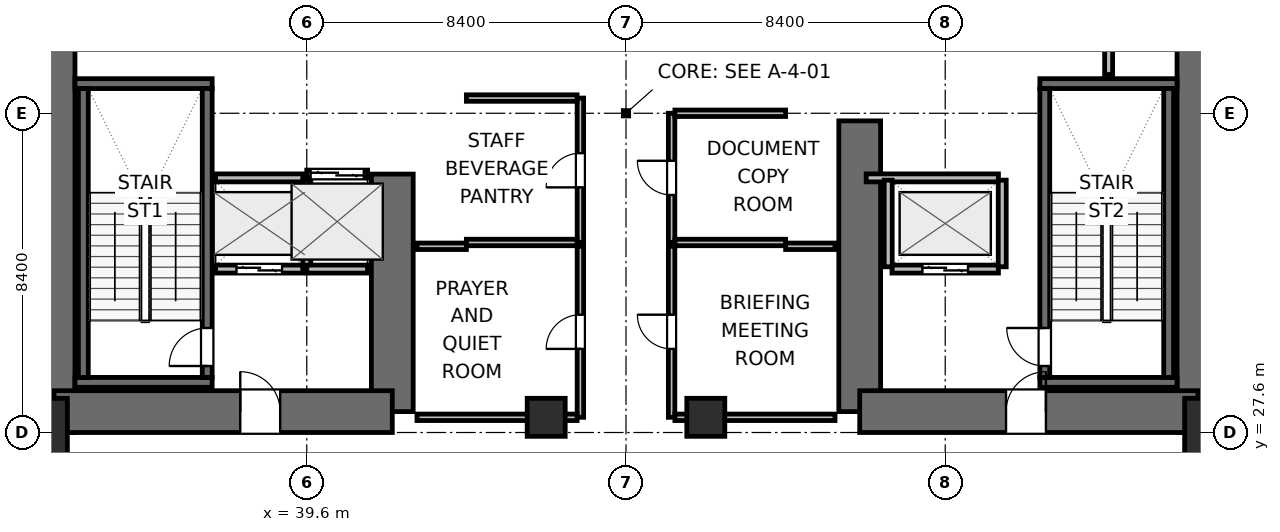
"""IFC4 building model, lengths in metres.
Left out: names, types, materials, properties, quantities, classifications, styles, units other than length and angle.
Written with IfcOpenShell. Run it as: python <this file> out.ifc"""

import sys

from ifc_helpers import new_model, si_unit, direction, frame, frame_2d, origin, origin_2d, place, context, subcontext, project, spatial, rectangle, extrude, element, fill, save


model = new_model("IFC4")
c1 = context("Model", 3, precision=1e-05, world=origin(), true_north=direction((0.0, 1.0)))
c2 = subcontext(c1, "Body", "Model", "MODEL_VIEW")
j1 = project(units=[si_unit("LENGTHUNIT", "METRE"), si_unit("PLANEANGLEUNIT", "RADIAN")], contexts=[c1])
p1 = place(None, origin())
s1 = spatial("IfcSite", under=j1, at=p1, CompositionType="ELEMENT")
p2 = place(p1, origin())
s2 = spatial("IfcBuilding", under=s1, at=p2, CompositionType="ELEMENT")
p3 = place(p2, frame((0.0, 0.0, -4.5)))
s3 = spatial("IfcBuildingStorey", under=s2, at=p3, CompositionType="ELEMENT", Elevation=-4.5)
p4 = place(p3, frame((32.95, 27.6, 0.0), z_axis=(0.0, 0.0, 1.0), x_axis=(0.0, 1.0, 0.0)))
e1 = element("IfcWall", 1, at=p4, inside=s3, PredefinedType="SHEAR", context=c2, shape_type="SweptSolid", body=[
    extrude(rectangle(XDim=16.8, YDim=1.1, at=frame_2d((8.4, 0.0))), origin(), (0.0, 0.0, 1.0), 4.5),
])
p5 = place(p3, frame((41.85, 28.15, 0.0), z_axis=(0.0, 0.0, 1.0), x_axis=(0.0, 1.0, 0.0)))
e2 = element("IfcWall", 2, at=p5, inside=s3, PredefinedType="SHEAR", context=c2, shape_type="SweptSolid", body=[
    extrude(rectangle(XDim=6.25, YDim=1.1, at=frame_2d((3.125, 0.0))), origin(), (0.0, 0.0, 1.0), 4.5),
])
p6 = place(p3, frame((32.95, 28.15, 0.0), z_axis=(0.0, 0.0, 1.0), x_axis=(1.0, 0.0, 0.0)))
e3 = element("IfcWall", 3, at=p6, inside=s3, PredefinedType="SHEAR", context=c2, shape_type="SweptSolid", body=[
    extrude(rectangle(XDim=8.9, YDim=1.1, at=frame_2d((4.45, 0.0))), origin(), (0.0, 0.0, 1.0), 4.5),
])
p7 = place(p6, frame((4.9, 0.0, 0.0)))
e4 = element("IfcOpeningElement", 4, at=p7, cuts=e3, PredefinedType="OPENING", context=c2, shape_type="SweptSolid", body=[
    extrude(rectangle(XDim=1.05, YDim=2.04, at=frame_2d((0.525, 1.02))), frame((0.0, 0.56, 0.0), z_axis=(0.0, -1.0, 0.0), x_axis=(1.0, 0.0, 0.0)), (0.0, 0.0, 1.0), 1.12),
])
p8 = place(p3, frame((54.15, 28.15, 0.0), z_axis=(0.0, 0.0, 1.0), x_axis=(0.0, 1.0, 0.0)))
e5 = element("IfcWall", 5, at=p8, inside=s3, PredefinedType="SHEAR", context=c2, shape_type="SweptSolid", body=[
    extrude(rectangle(XDim=7.65, YDim=1.1, at=frame_2d((3.825, 0.0))), origin(), (0.0, 0.0, 1.0), 4.5),
])
p9 = place(p3, frame((63.05, 27.6, 0.0), z_axis=(0.0, 0.0, 1.0), x_axis=(0.0, 1.0, 0.0)))
e6 = element("IfcWall", 6, at=p9, inside=s3, PredefinedType="SHEAR", context=c2, shape_type="SweptSolid", body=[
    extrude(rectangle(XDim=16.8, YDim=1.1, at=frame_2d((8.4, 0.0))), origin(), (0.0, 0.0, 1.0), 4.5),
])
p10 = place(p3, frame((54.15, 28.15, 0.0), z_axis=(0.0, 0.0, 1.0), x_axis=(1.0, 0.0, 0.0)))
e7 = element("IfcWall", 7, at=p10, inside=s3, PredefinedType="SHEAR", context=c2, shape_type="SweptSolid", body=[
    extrude(rectangle(XDim=8.9, YDim=1.1, at=frame_2d((4.45, 0.0))), origin(), (0.0, 0.0, 1.0), 4.5),
])
p11 = place(p10, frame((3.85, 0.0, 0.0)))
e8 = element("IfcOpeningElement", 8, at=p11, cuts=e7, PredefinedType="OPENING", context=c2, shape_type="SweptSolid", body=[
    extrude(rectangle(XDim=1.05, YDim=2.04, at=frame_2d((0.525, 1.02))), frame((0.0, 0.56, 0.0), z_axis=(0.0, -1.0, 0.0), x_axis=(1.0, 0.0, 0.0)), (0.0, 0.0, 1.0), 1.12),
])
for number, where, z_axis, x_axis in (
    (9, (33.5, 28.92, 0.0), (0.0, 0.0, 1.0), (1.0, 0.0, 0.0)),
    (10, (33.5, 36.78, 0.0), (0.0, 0.0, 1.0), (1.0, 0.0, 0.0)),
):
    element("IfcWall", number, at=place(p3, frame(where, z_axis=z_axis, x_axis=x_axis)), inside=s3, PredefinedType="SHEAR", context=c2, shape_type="SweptSolid", body=[
        extrude(rectangle(XDim=3.61, YDim=0.26, at=frame_2d((1.805, 0.0))), origin(), (0.0, 0.0, 1.0), 4.5),
    ])
p12 = place(p3, frame((33.72, 29.05, 0.0), z_axis=(0.0, 0.0, 1.0), x_axis=(0.0, 1.0, 0.0)))
e11 = element("IfcWall", 11, at=p12, inside=s3, PredefinedType="SHEAR", context=c2, shape_type="SweptSolid", body=[
    extrude(rectangle(XDim=7.6, YDim=0.26, at=frame_2d((3.8, 0.0))), origin(), (0.0, 0.0, 1.0), 4.5),
])
p13 = place(p3, frame((36.98, 29.05, 0.0), z_axis=(0.0, 0.0, 1.0), x_axis=(0.0, 1.0, 0.0)))
e12 = element("IfcWall", 12, at=p13, inside=s3, PredefinedType="SHEAR", context=c2, shape_type="SweptSolid", body=[
    extrude(rectangle(XDim=7.6, YDim=0.26, at=frame_2d((3.8, 0.0))), origin(), (0.0, 0.0, 1.0), 4.5),
])
p14 = place(p13, frame((0.3, 0.0, 0.0)))
e13 = element("IfcOpeningElement", 13, at=p14, cuts=e12, PredefinedType="OPENING", context=c2, shape_type="SweptSolid", body=[
    extrude(rectangle(XDim=1.0, YDim=2.04, at=frame_2d((0.5, 1.02))), frame((0.0, 0.14, 0.0), z_axis=(0.0, -1.0, 0.0), x_axis=(1.0, 0.0, 0.0)), (0.0, 0.0, 1.0), 0.28),
])
for number, where, z_axis, x_axis in (
    (14, (58.89, 28.92, 0.0), (0.0, 0.0, 1.0), (1.0, 0.0, 0.0)),
    (15, (58.89, 36.78, 0.0), (0.0, 0.0, 1.0), (1.0, 0.0, 0.0)),
):
    element("IfcWall", number, at=place(p3, frame(where, z_axis=z_axis, x_axis=x_axis)), inside=s3, PredefinedType="SHEAR", context=c2, shape_type="SweptSolid", body=[
        extrude(rectangle(XDim=3.61, YDim=0.26, at=frame_2d((1.805, 0.0))), origin(), (0.0, 0.0, 1.0), 4.5),
    ])
p15 = place(p3, frame((59.02, 29.05, 0.0), z_axis=(0.0, 0.0, 1.0), x_axis=(0.0, 1.0, 0.0)))
e16 = element("IfcWall", 16, at=p15, inside=s3, PredefinedType="SHEAR", context=c2, shape_type="SweptSolid", body=[
    extrude(rectangle(XDim=7.6, YDim=0.26, at=frame_2d((3.8, 0.0))), origin(), (0.0, 0.0, 1.0), 4.5),
])
p16 = place(p15, frame((0.3, 0.0, 0.0)))
e17 = element("IfcOpeningElement", 17, at=p16, cuts=e16, PredefinedType="OPENING", context=c2, shape_type="SweptSolid", body=[
    extrude(rectangle(XDim=1.0, YDim=2.04, at=frame_2d((0.5, 1.02))), frame((0.0, 0.14, 0.0), z_axis=(0.0, -1.0, 0.0), x_axis=(1.0, 0.0, 0.0)), (0.0, 0.0, 1.0), 0.28),
])
p17 = place(p3, frame((62.28, 29.05, 0.0), z_axis=(0.0, 0.0, 1.0), x_axis=(0.0, 1.0, 0.0)))
e18 = element("IfcWall", 18, at=p17, inside=s3, PredefinedType="SHEAR", context=c2, shape_type="SweptSolid", body=[
    extrude(rectangle(XDim=7.6, YDim=0.26, at=frame_2d((3.8, 0.0))), origin(), (0.0, 0.0, 1.0), 4.5),
])
for number, where, z_axis, x_axis in (
    (19, (32.4, 27.6, 0.0), (0.0, 0.0, 1.0), (1.0, 0.0, 0.0)),
    (20, (63.6, 27.6, 0.0), (0.0, 0.0, 1.0), (1.0, 0.0, 0.0)),
):
    element("IfcColumn", number, at=place(p3, frame(where, z_axis=z_axis, x_axis=x_axis)), inside=s3, PredefinedType="COLUMN", context=c2, shape_type="SweptSolid", body=[
        extrude(rectangle(XDim=1.8, YDim=1.8, at=origin_2d()), origin(), (0.0, 0.0, 1.0), 4.5),
    ])
for number, where, z_axis, x_axis in (
    (21, (45.9, 28.0, 0.0), (0.0, 0.0, 1.0), (1.0, 0.0, 0.0)),
    (22, (50.1, 28.0, 0.0), (0.0, 0.0, 1.0), (1.0, 0.0, 0.0)),
):
    element("IfcColumn", number, at=place(p3, frame(where, z_axis=z_axis, x_axis=x_axis)), inside=s3, PredefinedType="COLUMN", context=c2, shape_type="SweptSolid", body=[
        extrude(rectangle(XDim=1.0, YDim=1.0, at=origin_2d()), origin(), (0.0, 0.0, 1.0), 4.5),
    ])
p18 = place(p3, frame((60.7, 37.02, 0.0), z_axis=(0.0, 0.0, 1.0), x_axis=(0.0, 1.0, 0.0)))
e23 = element("IfcWall", 23, at=p18, inside=s3, PredefinedType="PARTITIONING", context=c2, shape_type="SweptSolid", body=[
    extrude(rectangle(XDim=1.96, YDim=0.21, at=frame_2d((0.98, 0.0))), origin(), (0.0, 0.0, 1.0), 4.18),
])
p19 = place(p3, frame((37.2, 31.9, 0.0), z_axis=(0.0, 0.0, 1.0), x_axis=(1.0, 0.0, 0.0)))
e24 = element("IfcWall", 24, at=p19, inside=s3, PredefinedType="PARTITIONING", context=c2, shape_type="SweptSolid", body=[
    extrude(rectangle(XDim=2.3, YDim=0.21, at=frame_2d((1.15, 0.0))), origin(), (0.0, 0.0, 1.0), 4.18),
])
p20 = place(p19, frame((0.55, 0.0, 0.0)))
e25 = element("IfcOpeningElement", 25, at=p20, cuts=e24, PredefinedType="OPENING", context=c2, shape_type="SweptSolid", body=[
    extrude(rectangle(XDim=1.2, YDim=2.04, at=frame_2d((0.6, 1.02))), frame((0.0, 0.115, 0.0), z_axis=(0.0, -1.0, 0.0), x_axis=(1.0, 0.0, 0.0)), (0.0, 0.0, 1.0), 0.23),
])
p21 = place(p3, frame((37.2, 34.3, 0.0), z_axis=(0.0, 0.0, 1.0), x_axis=(1.0, 0.0, 0.0)))
e26 = element("IfcWall", 26, at=p21, inside=s3, PredefinedType="PARTITIONING", context=c2, shape_type="SweptSolid", body=[
    extrude(rectangle(XDim=2.3, YDim=0.21, at=frame_2d((1.15, 0.0))), origin(), (0.0, 0.0, 1.0), 4.18),
])
p22 = place(p3, frame((39.6, 31.96, 0.0), z_axis=(0.0, 0.0, 1.0), x_axis=(0.0, 1.0, 0.0)))
e27 = element("IfcWall", 27, at=p22, inside=s3, PredefinedType="PARTITIONING", context=c2, shape_type="SweptSolid", body=[
    extrude(rectangle(XDim=2.28, YDim=0.21, at=frame_2d((1.14, 0.0))), origin(), (0.0, 0.0, 1.0), 4.18),
])
p23 = place(p3, frame((55.0, 31.9, 0.0), z_axis=(0.0, 0.0, 1.0), x_axis=(1.0, 0.0, 0.0)))
e28 = element("IfcWall", 28, at=p23, inside=s3, PredefinedType="PARTITIONING", context=c2, shape_type="SweptSolid", body=[
    extrude(rectangle(XDim=2.8, YDim=0.21, at=frame_2d((1.4, 0.0))), origin(), (0.0, 0.0, 1.0), 4.18),
])
p24 = place(p23, frame((0.8, 0.0, 0.0)))
e29 = element("IfcOpeningElement", 29, at=p24, cuts=e28, PredefinedType="OPENING", context=c2, shape_type="SweptSolid", body=[
    extrude(rectangle(XDim=1.2, YDim=2.04, at=frame_2d((0.6, 1.02))), frame((0.0, 0.115, 0.0), z_axis=(0.0, -1.0, 0.0), x_axis=(1.0, 0.0, 0.0)), (0.0, 0.0, 1.0), 0.23),
])
p25 = place(p3, frame((54.32, 34.3, 0.0), z_axis=(0.0, 0.0, 1.0), x_axis=(1.0, 0.0, 0.0)))
e30 = element("IfcWall", 30, at=p25, inside=s3, PredefinedType="PARTITIONING", context=c2, shape_type="SweptSolid", body=[
    extrude(rectangle(XDim=3.48, YDim=0.21, at=frame_2d((1.74, 0.0))), origin(), (0.0, 0.0, 1.0), 4.18),
])
for number, where, z_axis, x_axis in (
    (31, (54.9, 31.96, 0.0), (0.0, 0.0, 1.0), (0.0, 1.0, 0.0)),
    (32, (57.9, 31.96, 0.0), (0.0, 0.0, 1.0), (0.0, 1.0, 0.0)),
):
    element("IfcWall", number, at=place(p3, frame(where, z_axis=z_axis, x_axis=x_axis)), inside=s3, PredefinedType="PARTITIONING", context=c2, shape_type="SweptSolid", body=[
        extrude(rectangle(XDim=2.28, YDim=0.21, at=frame_2d((1.14, 0.0))), origin(), (0.0, 0.0, 1.0), 4.18),
    ])
p26 = place(p3, frame((39.6, 34.4, 0.0), z_axis=(0.0, 0.0, 1.0), x_axis=(1.0, 0.0, 0.0)))
e33 = element("IfcWall", 33, at=p26, inside=s3, PredefinedType="PARTITIONING", context=c2, shape_type="SweptSolid", body=[
    extrude(rectangle(XDim=1.6, YDim=0.21, at=frame_2d((0.8, 0.0))), origin(), (0.0, 0.0, 1.0), 4.18),
])
p27 = place(p26, frame((0.1, 0.0, 0.0)))
e34 = element("IfcOpeningElement", 34, at=p27, cuts=e33, PredefinedType="OPENING", context=c2, shape_type="SweptSolid", body=[
    extrude(rectangle(XDim=1.4, YDim=2.06, at=frame_2d((0.7, 1.03))), frame((0.0, 0.115, 0.0), z_axis=(0.0, -1.0, 0.0), x_axis=(1.0, 0.0, 0.0)), (0.0, 0.0, 1.0), 0.23),
])
p28 = place(p3, frame((39.6, 31.9, 0.0), z_axis=(0.0, 0.0, 1.0), x_axis=(1.0, 0.0, 0.0)))
e35 = element("IfcWall", 35, at=p28, inside=s3, PredefinedType="PARTITIONING", context=c2, shape_type="SweptSolid", body=[
    extrude(rectangle(XDim=1.6, YDim=0.21, at=frame_2d((0.8, 0.0))), origin(), (0.0, 0.0, 1.0), 4.18),
])
p29 = place(p3, frame((46.8, 32.6, 0.0), z_axis=(0.0, 0.0, 1.0), x_axis=(0.0, 1.0, 0.0)))
e36 = element("IfcWall", 36, at=p29, inside=s3, PredefinedType="PARTITIONING", context=c2, shape_type="SweptSolid", body=[
    extrude(rectangle(XDim=3.8, YDim=0.17, at=frame_2d((1.9, 0.0))), origin(), (0.0, 0.0, 1.0), 4.18),
])
p30 = place(p29, frame((1.45, 0.0, 0.0)))
e37 = element("IfcOpeningElement", 37, at=p30, cuts=e36, PredefinedType="OPENING", context=c2, shape_type="SweptSolid", body=[
    extrude(rectangle(XDim=0.9, YDim=2.02, at=frame_2d((0.45, 1.01))), frame((0.0, 0.095, 0.0), z_axis=(0.0, -1.0, 0.0), x_axis=(1.0, 0.0, 0.0)), (0.0, 0.0, 1.0), 0.19),
])
for number, where, z_axis, x_axis in (
    (38, (43.8, 32.6, 0.0), (0.0, 0.0, 1.0), (1.0, 0.0, 0.0)),
    (39, (43.8, 36.4, 0.0), (0.0, 0.0, 1.0), (1.0, 0.0, 0.0)),
):
    element("IfcWall", number, at=place(p3, frame(where, z_axis=z_axis, x_axis=x_axis)), inside=s3, PredefinedType="PARTITIONING", context=c2, shape_type="SweptSolid", body=[
        extrude(rectangle(XDim=2.913, YDim=0.17, at=frame_2d((1.457, 0.0))), origin(), (0.0, 0.0, 1.0), 4.18),
    ])
p31 = place(p3, frame((49.2, 32.6, 0.0), z_axis=(0.0, 0.0, 1.0), x_axis=(0.0, 1.0, 0.0)))
e40 = element("IfcWall", 40, at=p31, inside=s3, PredefinedType="PARTITIONING", context=c2, shape_type="SweptSolid", body=[
    extrude(rectangle(XDim=3.4, YDim=0.17, at=frame_2d((1.7, 0.0))), origin(), (0.0, 0.0, 1.0), 4.18),
])
p32 = place(p31, frame((1.25, 0.0, 0.0)))
e41 = element("IfcOpeningElement", 41, at=p32, cuts=e40, PredefinedType="OPENING", context=c2, shape_type="SweptSolid", body=[
    extrude(rectangle(XDim=0.9, YDim=2.02, at=frame_2d((0.45, 1.01))), frame((0.0, 0.095, 0.0), z_axis=(0.0, -1.0, 0.0), x_axis=(1.0, 0.0, 0.0)), (0.0, 0.0, 1.0), 0.19),
])
for number, where, z_axis, x_axis in (
    (42, (49.287, 32.6, 0.0), (0.0, 0.0, 1.0), (1.0, 0.0, 0.0)),
    (43, (49.287, 36.0, 0.0), (0.0, 0.0, 1.0), (1.0, 0.0, 0.0)),
):
    element("IfcWall", number, at=place(p3, frame(where, z_axis=z_axis, x_axis=x_axis)), inside=s3, PredefinedType="PARTITIONING", context=c2, shape_type="SweptSolid", body=[
        extrude(rectangle(XDim=2.913, YDim=0.17, at=frame_2d((1.457, 0.0))), origin(), (0.0, 0.0, 1.0), 4.18),
    ])
p33 = place(p3, frame((46.8, 28.0, 0.0), z_axis=(0.0, 0.0, 1.0), x_axis=(0.0, 1.0, 0.0)))
e44 = element("IfcWall", 44, at=p33, inside=s3, PredefinedType="PARTITIONING", context=c2, shape_type="SweptSolid", body=[
    extrude(rectangle(XDim=4.5, YDim=0.17, at=frame_2d((2.25, 0.0))), origin(), (0.0, 0.0, 1.0), 4.18),
])
p34 = place(p33, frame((1.8, 0.0, 0.0)))
e45 = element("IfcOpeningElement", 45, at=p34, cuts=e44, PredefinedType="OPENING", context=c2, shape_type="SweptSolid", body=[
    extrude(rectangle(XDim=0.9, YDim=2.02, at=frame_2d((0.45, 1.01))), frame((0.0, 0.095, 0.0), z_axis=(0.0, -1.0, 0.0), x_axis=(1.0, 0.0, 0.0)), (0.0, 0.0, 1.0), 0.19),
])
p35 = place(p3, frame((42.5, 28.0, 0.0), z_axis=(0.0, 0.0, 1.0), x_axis=(1.0, 0.0, 0.0)))
e46 = element("IfcWall", 46, at=p35, inside=s3, PredefinedType="PARTITIONING", context=c2, shape_type="SweptSolid", body=[
    extrude(rectangle(XDim=4.213, YDim=0.17, at=frame_2d((2.106, 0.0))), origin(), (0.0, 0.0, 1.0), 3.065),
])
p36 = place(p3, frame((42.5, 32.5, 0.0), z_axis=(0.0, 0.0, 1.0), x_axis=(1.0, 0.0, 0.0)))
e47 = element("IfcWall", 47, at=p36, inside=s3, PredefinedType="PARTITIONING", context=c2, shape_type="SweptSolid", body=[
    extrude(rectangle(XDim=1.3, YDim=0.17, at=frame_2d((0.65, 0.0))), origin(), (0.0, 0.0, 1.0), 4.18),
])
p37 = place(p3, frame((49.2, 28.0, 0.0), z_axis=(0.0, 0.0, 1.0), x_axis=(0.0, 1.0, 0.0)))
e48 = element("IfcWall", 48, at=p37, inside=s3, PredefinedType="PARTITIONING", context=c2, shape_type="SweptSolid", body=[
    extrude(rectangle(XDim=4.5, YDim=0.17, at=frame_2d((2.25, 0.0))), origin(), (0.0, 0.0, 1.0), 4.18),
])
p38 = place(p37, frame((1.8, 0.0, 0.0)))
e49 = element("IfcOpeningElement", 49, at=p38, cuts=e48, PredefinedType="OPENING", context=c2, shape_type="SweptSolid", body=[
    extrude(rectangle(XDim=0.9, YDim=2.02, at=frame_2d((0.45, 1.01))), frame((0.0, 0.095, 0.0), z_axis=(0.0, -1.0, 0.0), x_axis=(1.0, 0.0, 0.0)), (0.0, 0.0, 1.0), 0.19),
])
p39 = place(p3, frame((49.287, 28.0, 0.0), z_axis=(0.0, 0.0, 1.0), x_axis=(1.0, 0.0, 0.0)))
e50 = element("IfcWall", 50, at=p39, inside=s3, PredefinedType="PARTITIONING", context=c2, shape_type="SweptSolid", body=[
    extrude(rectangle(XDim=4.213, YDim=0.17, at=frame_2d((2.106, 0.0))), origin(), (0.0, 0.0, 1.0), 3.065),
])
p40 = place(p3, frame((52.2, 32.5, 0.0), z_axis=(0.0, 0.0, 1.0), x_axis=(1.0, 0.0, 0.0)))
e51 = element("IfcWall", 51, at=p40, inside=s3, PredefinedType="PARTITIONING", context=c2, shape_type="SweptSolid", body=[
    extrude(rectangle(XDim=1.3, YDim=0.17, at=frame_2d((0.65, 0.0))), origin(), (0.0, 0.0, 1.0), 4.18),
])
p41 = place(p14, origin())
e52 = element("IfcDoor", 52, at=p41, inside=s3, OperationType="SINGLE_SWING_LEFT", PredefinedType="DOOR", context=c2, shape_type="SweptSolid", body=[
    extrude(rectangle(XDim=1.0, YDim=2.04, at=frame_2d((0.5, 1.02))), frame((0.0, 0.025, 0.0), z_axis=(0.0, -1.0, 0.0), x_axis=(1.0, 0.0, 0.0)), (0.0, 0.0, 1.0), 0.05),
])
fill(e13, e52)
p42 = place(p16, origin())
e53 = element("IfcDoor", 53, at=p42, inside=s3, OperationType="SINGLE_SWING_RIGHT", PredefinedType="DOOR", context=c2, shape_type="SweptSolid", body=[
    extrude(rectangle(XDim=1.0, YDim=2.04, at=frame_2d((0.5, 1.02))), frame((0.0, 0.025, 0.0), z_axis=(0.0, -1.0, 0.0), x_axis=(1.0, 0.0, 0.0)), (0.0, 0.0, 1.0), 0.05),
])
fill(e17, e53)
p43 = place(p20, origin())
e54 = element("IfcDoor", 54, at=p43, inside=s3, OperationType="DOUBLE_DOOR_SLIDING", PredefinedType="DOOR", context=c2, shape_type="SweptSolid", body=[
    extrude(rectangle(XDim=1.2, YDim=2.04, at=frame_2d((0.6, 1.02))), frame((0.0, 0.025, 0.0), z_axis=(0.0, -1.0, 0.0), x_axis=(1.0, 0.0, 0.0)), (0.0, 0.0, 1.0), 0.05),
])
fill(e25, e54)
p44 = place(p24, origin())
e55 = element("IfcDoor", 55, at=p44, inside=s3, OperationType="DOUBLE_DOOR_SLIDING", PredefinedType="DOOR", context=c2, shape_type="SweptSolid", body=[
    extrude(rectangle(XDim=1.2, YDim=2.04, at=frame_2d((0.6, 1.02))), frame((0.0, 0.025, 0.0), z_axis=(0.0, -1.0, 0.0), x_axis=(1.0, 0.0, 0.0)), (0.0, 0.0, 1.0), 0.05),
])
fill(e29, e55)
p45 = place(p27, origin())
e56 = element("IfcDoor", 56, at=p45, inside=s3, OperationType="DOUBLE_DOOR_SLIDING", PredefinedType="DOOR", context=c2, shape_type="SweptSolid", body=[
    extrude(rectangle(XDim=1.4, YDim=2.06, at=frame_2d((0.7, 1.03))), frame((0.0, 0.025, 0.0), z_axis=(0.0, -1.0, 0.0), x_axis=(1.0, 0.0, 0.0)), (0.0, 0.0, 1.0), 0.05),
])
fill(e34, e56)
p46 = place(p7, origin())
e57 = element("IfcDoor", 57, at=p46, inside=s3, OperationType="SINGLE_SWING_LEFT", PredefinedType="DOOR", context=c2, shape_type="SweptSolid", body=[
    extrude(rectangle(XDim=1.05, YDim=2.04, at=frame_2d((0.525, 1.02))), frame((0.0, 0.025, 0.0), z_axis=(0.0, -1.0, 0.0), x_axis=(1.0, 0.0, 0.0)), (0.0, 0.0, 1.0), 0.05),
])
fill(e4, e57)
p47 = place(p11, origin())
e58 = element("IfcDoor", 58, at=p47, inside=s3, OperationType="SINGLE_SWING_RIGHT", PredefinedType="DOOR", context=c2, shape_type="SweptSolid", body=[
    extrude(rectangle(XDim=1.05, YDim=2.04, at=frame_2d((0.525, 1.02))), frame((0.0, 0.025, 0.0), z_axis=(0.0, -1.0, 0.0), x_axis=(1.0, 0.0, 0.0)), (0.0, 0.0, 1.0), 0.05),
])
fill(e8, e58)
p48 = place(p30, origin())
e59 = element("IfcDoor", 59, at=p48, inside=s3, OperationType="SINGLE_SWING_LEFT", PredefinedType="DOOR", context=c2, shape_type="SweptSolid", body=[
    extrude(rectangle(XDim=0.9, YDim=2.02, at=frame_2d((0.45, 1.01))), frame((0.0, 0.025, 0.0), z_axis=(0.0, -1.0, 0.0), x_axis=(1.0, 0.0, 0.0)), (0.0, 0.0, 1.0), 0.05),
])
fill(e37, e59)
p49 = place(p32, origin())
e60 = element("IfcDoor", 60, at=p49, inside=s3, OperationType="SINGLE_SWING_RIGHT", PredefinedType="DOOR", context=c2, shape_type="SweptSolid", body=[
    extrude(rectangle(XDim=0.9, YDim=2.02, at=frame_2d((0.45, 1.01))), frame((0.0, 0.025, 0.0), z_axis=(0.0, -1.0, 0.0), x_axis=(1.0, 0.0, 0.0)), (0.0, 0.0, 1.0), 0.05),
])
fill(e41, e60)
p50 = place(p34, origin())
e61 = element("IfcDoor", 61, at=p50, inside=s3, OperationType="SINGLE_SWING_LEFT", PredefinedType="DOOR", context=c2, shape_type="SweptSolid", body=[
    extrude(rectangle(XDim=0.9, YDim=2.02, at=frame_2d((0.45, 1.01))), frame((0.0, 0.025, 0.0), z_axis=(0.0, -1.0, 0.0), x_axis=(1.0, 0.0, 0.0)), (0.0, 0.0, 1.0), 0.05),
])
fill(e45, e61)
p51 = place(p38, origin())
e62 = element("IfcDoor", 62, at=p51, inside=s3, OperationType="SINGLE_SWING_RIGHT", PredefinedType="DOOR", context=c2, shape_type="SweptSolid", body=[
    extrude(rectangle(XDim=0.9, YDim=2.02, at=frame_2d((0.45, 1.01))), frame((0.0, 0.025, 0.0), z_axis=(0.0, -1.0, 0.0), x_axis=(1.0, 0.0, 0.0)), (0.0, 0.0, 1.0), 0.05),
])
fill(e49, e62)
save(model, sys.argv[1])
